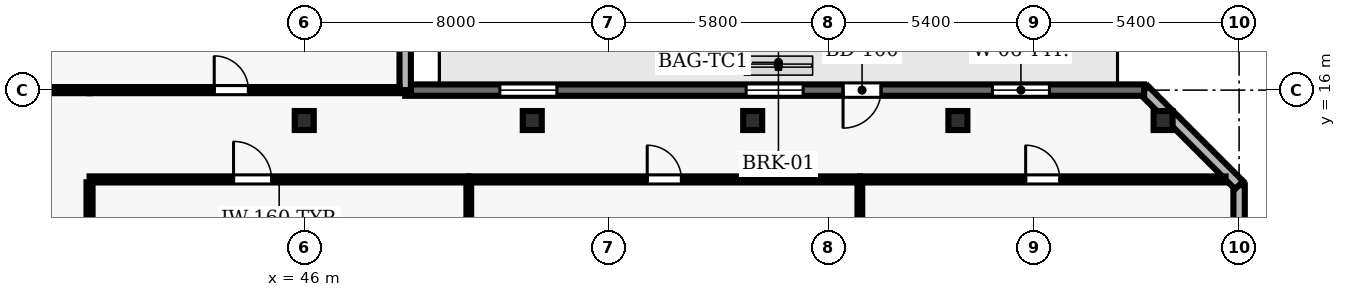
"""IFC4 building model, lengths in metres.
Left out: names, types, materials, properties, quantities, classifications, styles, units other than length and angle.
Written with IfcOpenShell. Run it as: python <this file> out.ifc"""

import sys

from ifc_helpers import new_model, si_unit, direction, frame, frame_2d, origin, origin_2d, place, context, subcontext, project, spatial, rectangle, hollow_rectangle, extrude, element, fill, save


model = new_model("IFC4")
c1 = context("Model", 3, precision=1e-05, world=origin(), true_north=direction((0.0, 1.0)))
c2 = subcontext(c1, "Body", "Model", "MODEL_VIEW")
j1 = project(units=[si_unit("LENGTHUNIT", "METRE"), si_unit("PLANEANGLEUNIT", "RADIAN")], contexts=[c1])
p1 = place(None, origin())
s1 = spatial("IfcSite", under=j1, at=p1, CompositionType="ELEMENT")
p2 = place(p1, origin())
s2 = spatial("IfcBuilding", under=s1, at=p2, CompositionType="ELEMENT")
p3 = place(p2, frame((0.0, 0.0, 107.3)))
s3 = spatial("IfcBuildingStorey", under=s2, at=p3, CompositionType="ELEMENT", Elevation=107.3)
for number, where, z_axis, x_axis in (
    (1, (46.0, 15.2, 0.0), (0.0, 0.0, 1.0), (1.0, 0.0, 0.0)),
    (2, (52.0, 15.2, 0.0), (0.0, 0.0, 1.0), (1.0, 0.0, 0.0)),
    (3, (57.8, 15.2, 0.0), (0.0, 0.0, 1.0), (1.0, 0.0, 0.0)),
    (4, (63.2, 15.2, 0.0), (0.0, 0.0, 1.0), (1.0, 0.0, 0.0)),
    (5, (68.6, 15.2, 0.0), (0.0, 0.0, 1.0), (1.0, 0.0, 0.0)),
):
    element("IfcColumn", number, at=place(p3, frame(where, z_axis=z_axis, x_axis=x_axis)), inside=s3, PredefinedType="COLUMN", context=c2, shape_type="SweptSolid", body=[
        extrude(hollow_rectangle(XDim=0.5, YDim=0.5, WallThickness=0.025, at=origin_2d()), origin(), (0.0, 0.0, 1.0), 3.9),
    ])
p4 = place(p3, frame((70.6, 2.5, 0.0), z_axis=(0.0, 0.0, 1.0), x_axis=(0.0, 1.0, 0.0)))
e6 = element("IfcWall", 6, at=p4, inside=s3, PredefinedType="SOLIDWALL", context=c2, shape_type="SweptSolid", body=[
    extrude(rectangle(XDim=11.0, YDim=0.3, at=frame_2d((5.5, 0.0))), origin(), (0.0, 0.0, 1.0), 3.69),
])
p5 = place(p4, frame((1.7, 0.0, 0.9)))
e7 = element("IfcOpeningElement", 7, at=p5, cuts=e6, PredefinedType="OPENING", context=c2, shape_type="SweptSolid", body=[
    extrude(rectangle(XDim=2.1, YDim=1.6, at=frame_2d((1.05, 0.8))), frame((0.0, 0.16, 0.0), z_axis=(0.0, -1.0, 0.0), x_axis=(1.0, 0.0, 0.0)), (0.0, 0.0, 1.0), 0.32),
])
p6 = place(p4, frame((7.2, 0.0, 0.9)))
e8 = element("IfcOpeningElement", 8, at=p6, cuts=e6, PredefinedType="OPENING", context=c2, shape_type="SweptSolid", body=[
    extrude(rectangle(XDim=2.1, YDim=1.6, at=frame_2d((1.05, 0.8))), frame((0.0, 0.16, 0.0), z_axis=(0.0, -1.0, 0.0), x_axis=(1.0, 0.0, 0.0)), (0.0, 0.0, 1.0), 0.32),
])
p7 = place(p3, frame((70.6, 13.5, 0.0), z_axis=(0.0, 0.0, 1.0), x_axis=(-0.707106781187, 0.707106781187, 0.0)))
e9 = element("IfcWall", 9, at=p7, inside=s3, PredefinedType="SOLIDWALL", context=c2, shape_type="SweptSolid", body=[
    extrude(rectangle(XDim=3.536, YDim=0.3, at=frame_2d((1.768, 0.0))), origin(), (0.0, 0.0, 1.0), 3.69),
])
p8 = place(p3, frame((68.1, 16.0, 0.0), z_axis=(0.0, 0.0, 1.0), x_axis=(-1.0, 0.0, 0.0)))
e10 = element("IfcWall", 10, at=p8, inside=s3, PredefinedType="SOLIDWALL", context=c2, shape_type="SweptSolid", body=[
    extrude(rectangle(XDim=19.444, YDim=0.3, at=frame_2d((9.722, 0.0))), origin(), (0.0, 0.0, 1.0), 3.69),
])
p9 = place(p8, frame((6.922, 0.0, 0.0)))
e11 = element("IfcOpeningElement", 11, at=p9, cuts=e10, PredefinedType="OPENING", context=c2, shape_type="SweptSolid", body=[
    extrude(rectangle(XDim=1.0, YDim=2.2, at=frame_2d((0.5, 1.1))), frame((0.0, 0.16, 0.0), z_axis=(0.0, -1.0, 0.0), x_axis=(1.0, 0.0, 0.0)), (0.0, 0.0, 1.0), 0.32),
])
p10 = place(p8, frame((2.491, 0.0, 0.9)))
e12 = element("IfcOpeningElement", 12, at=p10, cuts=e10, PredefinedType="OPENING", context=c2, shape_type="SweptSolid", body=[
    extrude(rectangle(XDim=1.5, YDim=1.8, at=frame_2d((0.75, 0.9))), frame((0.0, 0.16, 0.0), z_axis=(0.0, -1.0, 0.0), x_axis=(1.0, 0.0, 0.0)), (0.0, 0.0, 1.0), 0.32),
])
p11 = place(p8, frame((8.972, 0.0, 0.9)))
e13 = element("IfcOpeningElement", 13, at=p11, cuts=e10, PredefinedType="OPENING", context=c2, shape_type="SweptSolid", body=[
    extrude(rectangle(XDim=1.5, YDim=1.8, at=frame_2d((0.75, 0.9))), frame((0.0, 0.16, 0.0), z_axis=(0.0, -1.0, 0.0), x_axis=(1.0, 0.0, 0.0)), (0.0, 0.0, 1.0), 0.32),
])
p12 = place(p8, frame((15.453, 0.0, 0.9)))
e14 = element("IfcOpeningElement", 14, at=p12, cuts=e10, PredefinedType="OPENING", context=c2, shape_type="SweptSolid", body=[
    extrude(rectangle(XDim=1.5, YDim=1.8, at=frame_2d((0.75, 0.9))), frame((0.0, 0.16, 0.0), z_axis=(0.0, -1.0, 0.0), x_axis=(1.0, 0.0, 0.0)), (0.0, 0.0, 1.0), 0.32),
])
p13 = place(p3, frame((48.656, 16.0, 0.0), z_axis=(0.0, 0.0, 1.0), x_axis=(0.0, 1.0, 0.0)))
e15 = element("IfcWall", 15, at=p13, inside=s3, PredefinedType="SOLIDWALL", context=c2, shape_type="SweptSolid", body=[
    extrude(rectangle(XDim=13.6, YDim=0.3, at=frame_2d((6.8, 0.0))), origin(), (0.0, 0.0, 1.0), 3.69),
])
p14 = place(p13, frame((2.5, 0.0, 0.9)))
e16 = element("IfcOpeningElement", 16, at=p14, cuts=e15, PredefinedType="OPENING", context=c2, shape_type="SweptSolid", body=[
    extrude(rectangle(XDim=1.8, YDim=1.8, at=frame_2d((0.9, 0.9))), frame((0.0, 0.16, 0.0), z_axis=(0.0, -1.0, 0.0), x_axis=(1.0, 0.0, 0.0)), (0.0, 0.0, 1.0), 0.32),
])
p15 = place(p13, frame((9.3, 0.0, 0.9)))
e17 = element("IfcOpeningElement", 17, at=p15, cuts=e15, PredefinedType="OPENING", context=c2, shape_type="SweptSolid", body=[
    extrude(rectangle(XDim=1.8, YDim=1.8, at=frame_2d((0.9, 0.9))), frame((0.0, 0.16, 0.0), z_axis=(0.0, -1.0, 0.0), x_axis=(1.0, 0.0, 0.0)), (0.0, 0.0, 1.0), 0.32),
])
p16 = place(p3, frame((40.35, 13.65, 0.0), z_axis=(0.0, 0.0, 1.0), x_axis=(1.0, 0.0, 0.0)))
e18 = element("IfcWall", 18, at=p16, inside=s3, PredefinedType="PARTITIONING", context=c2, shape_type="SweptSolid", body=[
    extrude(rectangle(XDim=9.98, YDim=0.16, at=frame_2d((4.99, 0.0))), origin(), (0.0, 0.0, 1.0), 3.69),
])
p17 = place(p16, frame((3.79, 0.0, 0.0)))
e19 = element("IfcOpeningElement", 19, at=p17, cuts=e18, PredefinedType="OPENING", context=c2, shape_type="SweptSolid", body=[
    extrude(rectangle(XDim=1.0, YDim=2.1, at=frame_2d((0.5, 1.05))), frame((0.0, 0.09, 0.0), z_axis=(0.0, -1.0, 0.0), x_axis=(1.0, 0.0, 0.0)), (0.0, 0.0, 1.0), 0.18),
])
p18 = place(p3, frame((40.35, 16.0, 0.0), z_axis=(0.0, 0.0, 1.0), x_axis=(-1.0, 0.0, 0.0)))
e20 = element("IfcWall", 20, at=p18, inside=s3, PredefinedType="PARTITIONING", context=c2, shape_type="SweptSolid", body=[
    extrude(rectangle(XDim=2.3, YDim=0.16, at=frame_2d((1.15, 0.0))), origin(), (0.0, 0.0, 1.0), 3.69),
])
p19 = place(p3, frame((40.35, 16.0, 0.0), z_axis=(0.0, 0.0, 1.0), x_axis=(1.0, 0.0, 0.0)))
e21 = element("IfcWall", 21, at=p19, inside=s3, PredefinedType="PARTITIONING", context=c2, shape_type="SweptSolid", body=[
    extrude(rectangle(XDim=8.161, YDim=0.16, at=frame_2d((4.081, 0.0))), origin(), (0.0, 0.0, 1.0), 3.69),
])
p20 = place(p19, frame((3.281, 0.0, 0.0)))
e22 = element("IfcOpeningElement", 22, at=p20, cuts=e21, PredefinedType="OPENING", context=c2, shape_type="SweptSolid", body=[
    extrude(rectangle(XDim=0.9, YDim=2.1, at=frame_2d((0.45, 1.05))), frame((0.0, 0.09, 0.0), z_axis=(0.0, -1.0, 0.0), x_axis=(1.0, 0.0, 0.0)), (0.0, 0.0, 1.0), 0.18),
])
p21 = place(p3, frame((50.33, 13.65, 0.0), z_axis=(0.0, 0.0, 1.0), x_axis=(1.0, 0.0, 0.0)))
e23 = element("IfcWall", 23, at=p21, inside=s3, PredefinedType="PARTITIONING", context=c2, shape_type="SweptSolid", body=[
    extrude(rectangle(XDim=10.29, YDim=0.16, at=frame_2d((5.145, 0.0))), origin(), (0.0, 0.0, 1.0), 3.69),
])
p22 = place(p21, frame((4.695, 0.0, 0.0)))
e24 = element("IfcOpeningElement", 24, at=p22, cuts=e23, PredefinedType="OPENING", context=c2, shape_type="SweptSolid", body=[
    extrude(rectangle(XDim=0.9, YDim=2.1, at=frame_2d((0.45, 1.05))), frame((0.0, 0.09, 0.0), z_axis=(0.0, -1.0, 0.0), x_axis=(1.0, 0.0, 0.0)), (0.0, 0.0, 1.0), 0.18),
])
p23 = place(p3, frame((60.62, 13.65, 0.0), z_axis=(0.0, 0.0, 1.0), x_axis=(1.0, 0.0, 0.0)))
e25 = element("IfcWall", 25, at=p23, inside=s3, PredefinedType="PARTITIONING", context=c2, shape_type="SweptSolid", body=[
    extrude(rectangle(XDim=9.625, YDim=0.16, at=frame_2d((4.812, 0.0))), origin(), (0.0, 0.0, 1.0), 3.69),
])
p24 = place(p23, frame((4.363, 0.0, 0.0)))
e26 = element("IfcOpeningElement", 26, at=p24, cuts=e25, PredefinedType="OPENING", context=c2, shape_type="SweptSolid", body=[
    extrude(rectangle(XDim=0.9, YDim=2.1, at=frame_2d((0.45, 1.05))), frame((0.0, 0.09, 0.0), z_axis=(0.0, -1.0, 0.0), x_axis=(1.0, 0.0, 0.0)), (0.0, 0.0, 1.0), 0.18),
])
p25 = place(p3, frame((40.35, 8.0, 0.0), z_axis=(0.0, 0.0, 1.0), x_axis=(0.0, 1.0, 0.0)))
e27 = element("IfcWall", 27, at=p25, inside=s3, PredefinedType="PARTITIONING", context=c2, shape_type="SweptSolid", body=[
    extrude(rectangle(XDim=5.575, YDim=0.16, at=frame_2d((2.788, 0.0))), origin(), (0.0, 0.0, 1.0), 3.69),
])
for number, where, z_axis, x_axis in (
    (28, (50.33, 8.018, 0.0), (0.0, 0.0, 1.0), (0.0, 1.0, 0.0)),
    (29, (60.62, 8.018, 0.0), (0.0, 0.0, 1.0), (0.0, 1.0, 0.0)),
):
    element("IfcWall", number, at=place(p3, frame(where, z_axis=z_axis, x_axis=x_axis)), inside=s3, PredefinedType="PARTITIONING", context=c2, shape_type="SweptSolid", body=[
        extrude(rectangle(XDim=5.557, YDim=0.125, at=frame_2d((2.778, 0.0))), origin(), (0.0, 0.0, 1.0), 3.69),
    ])
p26 = place(p9, origin())
e30 = element("IfcDoor", 30, at=p26, inside=s3, OperationType="SINGLE_SWING_RIGHT", PredefinedType="DOOR", context=c2, shape_type="SweptSolid", body=[
    extrude(rectangle(XDim=1.0, YDim=2.2, at=frame_2d((0.5, 1.1))), frame((0.0, 0.025, 0.0), z_axis=(0.0, -1.0, 0.0), x_axis=(1.0, 0.0, 0.0)), (0.0, 0.0, 1.0), 0.05),
])
fill(e11, e30)
p27 = place(p10, origin())
e31 = element("IfcWindow", 31, at=p27, inside=s3, PartitioningType="SINGLE_PANEL", PredefinedType="WINDOW", context=c2, shape_type="SweptSolid", body=[
    extrude(rectangle(XDim=1.5, YDim=1.8, at=frame_2d((0.75, 0.9))), frame((0.0, 0.03, 0.0), z_axis=(0.0, -1.0, 0.0), x_axis=(1.0, 0.0, 0.0)), (0.0, 0.0, 1.0), 0.06),
])
fill(e12, e31)
p28 = place(p11, origin())
e32 = element("IfcWindow", 32, at=p28, inside=s3, PartitioningType="SINGLE_PANEL", PredefinedType="WINDOW", context=c2, shape_type="SweptSolid", body=[
    extrude(rectangle(XDim=1.5, YDim=1.8, at=frame_2d((0.75, 0.9))), frame((0.0, 0.03, 0.0), z_axis=(0.0, -1.0, 0.0), x_axis=(1.0, 0.0, 0.0)), (0.0, 0.0, 1.0), 0.06),
])
fill(e13, e32)
p29 = place(p12, origin())
e33 = element("IfcWindow", 33, at=p29, inside=s3, PartitioningType="SINGLE_PANEL", PredefinedType="WINDOW", context=c2, shape_type="SweptSolid", body=[
    extrude(rectangle(XDim=1.5, YDim=1.8, at=frame_2d((0.75, 0.9))), frame((0.0, 0.03, 0.0), z_axis=(0.0, -1.0, 0.0), x_axis=(1.0, 0.0, 0.0)), (0.0, 0.0, 1.0), 0.06),
])
fill(e14, e33)
p30 = place(p17, origin())
e34 = element("IfcDoor", 34, at=p30, inside=s3, OperationType="SINGLE_SWING_LEFT", PredefinedType="DOOR", context=c2, shape_type="SweptSolid", body=[
    extrude(rectangle(XDim=1.0, YDim=2.1, at=frame_2d((0.5, 1.05))), frame((0.0, 0.025, 0.0), z_axis=(0.0, -1.0, 0.0), x_axis=(1.0, 0.0, 0.0)), (0.0, 0.0, 1.0), 0.05),
])
fill(e19, e34)
p31 = place(p22, origin())
e35 = element("IfcDoor", 35, at=p31, inside=s3, OperationType="SINGLE_SWING_LEFT", PredefinedType="DOOR", context=c2, shape_type="SweptSolid", body=[
    extrude(rectangle(XDim=0.9, YDim=2.1, at=frame_2d((0.45, 1.05))), frame((0.0, 0.025, 0.0), z_axis=(0.0, -1.0, 0.0), x_axis=(1.0, 0.0, 0.0)), (0.0, 0.0, 1.0), 0.05),
])
fill(e24, e35)
p32 = place(p24, origin())
e36 = element("IfcDoor", 36, at=p32, inside=s3, OperationType="SINGLE_SWING_LEFT", PredefinedType="DOOR", context=c2, shape_type="SweptSolid", body=[
    extrude(rectangle(XDim=0.9, YDim=2.1, at=frame_2d((0.45, 1.05))), frame((0.0, 0.025, 0.0), z_axis=(0.0, -1.0, 0.0), x_axis=(1.0, 0.0, 0.0)), (0.0, 0.0, 1.0), 0.05),
])
fill(e26, e36)
p33 = place(p20, origin())
e37 = element("IfcDoor", 37, at=p33, inside=s3, OperationType="SINGLE_SWING_LEFT", PredefinedType="DOOR", context=c2, shape_type="SweptSolid", body=[
    extrude(rectangle(XDim=0.9, YDim=2.1, at=frame_2d((0.45, 1.05))), frame((0.0, 0.025, 0.0), z_axis=(0.0, -1.0, 0.0), x_axis=(1.0, 0.0, 0.0)), (0.0, 0.0, 1.0), 0.05),
])
fill(e22, e37)
save(model, sys.argv[1])
